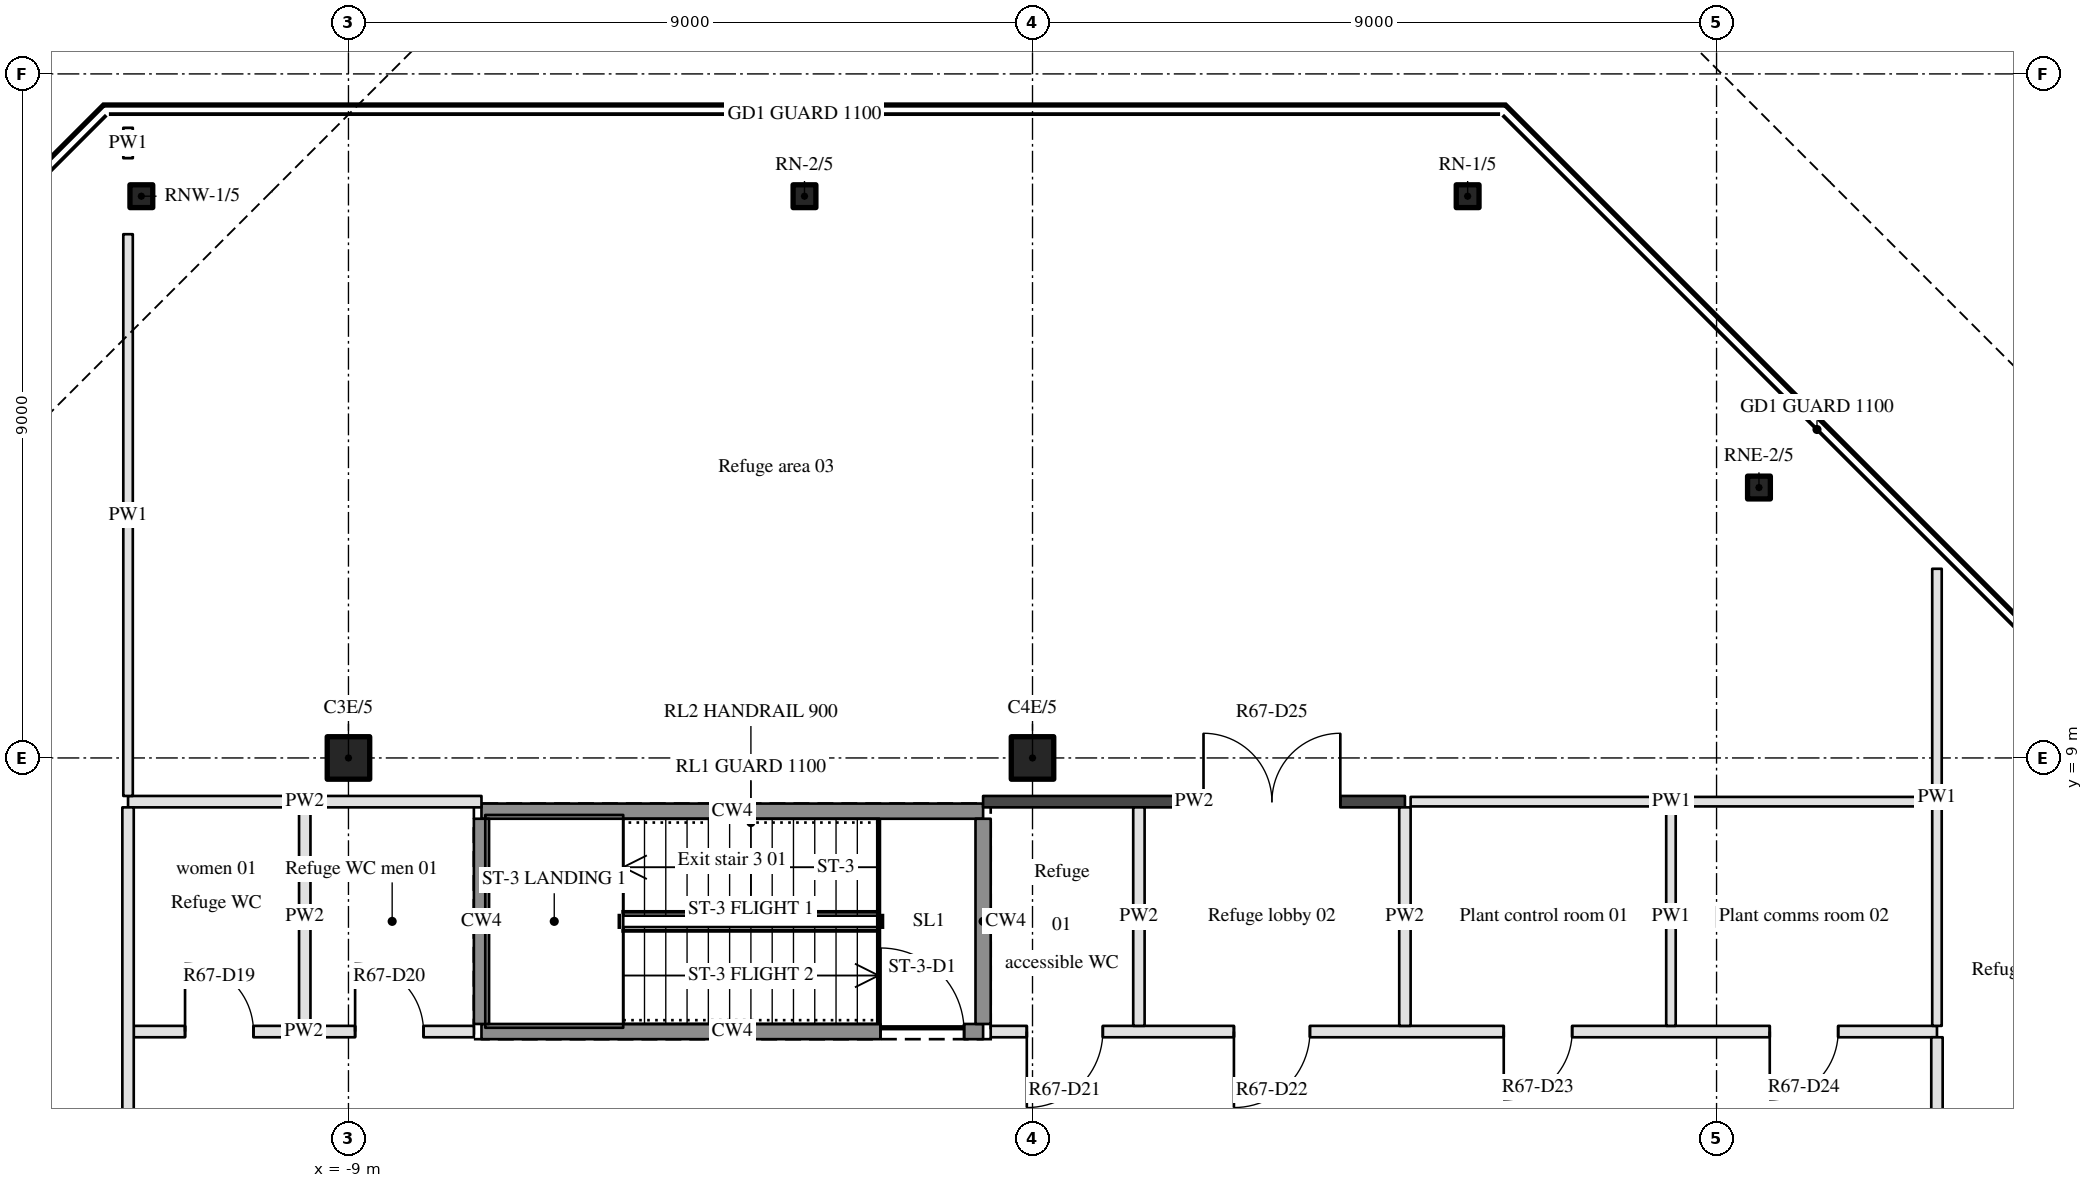
"""IFC4 building model, lengths in metres.
Left out: names, types, materials, properties, quantities, classifications, styles, units other than length and angle.
Written with IfcOpenShell. Run it as: python <this file> out.ifc"""

import sys

from ifc_helpers import new_model, si_unit, direction, frame, frame_2d, origin, origin_2d, place, context, subcontext, project, spatial, rectangle, hollow_rectangle, hollow_circle, extrude, element, fill, save


model = new_model("IFC4")
c1 = context("Model", 3, precision=1e-05, world=origin(), true_north=direction((0.0, 1.0)))
c2 = subcontext(c1, "Body", "Model", "MODEL_VIEW")
j1 = project(units=[si_unit("LENGTHUNIT", "METRE"), si_unit("PLANEANGLEUNIT", "RADIAN")], contexts=[c1])
p1 = place(None, origin())
s1 = spatial("IfcSite", under=j1, at=p1, CompositionType="ELEMENT")
p2 = place(p1, origin())
s2 = spatial("IfcBuilding", under=s1, at=p2, CompositionType="ELEMENT")
p3 = place(p2, frame((0.0, 0.0, 255.0)))
s3 = spatial("IfcBuildingStorey", under=s2, at=p3, CompositionType="ELEMENT", Elevation=255.0)
p4 = place(p3, frame((-9.0, 9.0, 0.0), z_axis=(0.0, 0.0, 1.0), x_axis=(1.0, 0.0, 0.0)))
e1 = element("IfcColumn", 1, at=p4, inside=s3, PredefinedType="COLUMN", context=c2, shape_type="SweptSolid", body=[
    extrude(hollow_circle(Radius=0.28, WallThickness=0.025, at=origin_2d()), origin(), (0.0, 0.0, 1.0), 4.08),
])
p5 = place(p3, frame((0.0, 9.0, 0.0), z_axis=(0.0, 0.0, 1.0), x_axis=(1.0, 0.0, 0.0)))
e2 = element("IfcColumn", 2, at=p5, inside=s3, PredefinedType="COLUMN", context=c2, shape_type="SweptSolid", body=[
    extrude(hollow_circle(Radius=0.28, WallThickness=0.025, at=origin_2d()), origin(), (0.0, 0.0, 1.0), 4.5),
])
for number, where, z_axis, x_axis in (
    (3, (9.558, 12.558, 0.0), (0.0, 0.0, 1.0), (1.0, 0.0, 0.0)),
    (4, (5.725, 16.391, 0.0), (0.0, 0.0, 1.0), (1.0, 0.0, 0.0)),
    (5, (-3.0, 16.391, 0.0), (0.0, 0.0, 1.0), (1.0, 0.0, 0.0)),
):
    element("IfcColumn", number, at=place(p3, frame(where, z_axis=z_axis, x_axis=x_axis)), inside=s3, PredefinedType="COLUMN", context=c2, shape_type="SweptSolid", body=[
        extrude(hollow_rectangle(XDim=0.3, YDim=0.3, WallThickness=0.02, InnerFilletRadius=0.03, OuterFilletRadius=0.05, at=origin_2d()), origin(), (0.0, 0.0, 1.0), 4.08),
    ])
p6 = place(p3, frame((-11.725, 16.391, 0.0), z_axis=(0.0, 0.0, 1.0), x_axis=(1.0, 0.0, 0.0)))
e6 = element("IfcColumn", 6, at=p6, inside=s3, PredefinedType="COLUMN", context=c2, shape_type="SweptSolid", body=[
    extrude(hollow_rectangle(XDim=0.3, YDim=0.3, WallThickness=0.02, InnerFilletRadius=0.03, OuterFilletRadius=0.05, at=origin_2d()), origin(), (0.0, 0.0, 1.0), 4.25),
])
p7 = place(p3, frame((-11.825, 5.4, 0.0), z_axis=(0.0, 0.0, 1.0), x_axis=(1.0, 0.0, 0.0)))
e7 = element("IfcWall", 7, at=p7, inside=s3, PredefinedType="PARTITIONING", context=c2, shape_type="SweptSolid", body=[
    extrude(rectangle(XDim=4.475, YDim=0.15, at=frame_2d((2.237, 0.0))), origin(), (0.0, 0.0, 1.0), 3.56),
])
p8 = place(p7, frame((0.675, 0.0, 0.0)))
e8 = element("IfcOpeningElement", 8, at=p8, cuts=e7, PredefinedType="OPENING", context=c2, shape_type="SweptSolid", body=[
    extrude(rectangle(XDim=0.9, YDim=2.1, at=frame_2d((0.45, 1.05))), frame((0.0, 0.085, 0.0), z_axis=(0.0, -1.0, 0.0), x_axis=(1.0, 0.0, 0.0)), (0.0, 0.0, 1.0), 0.17),
])
p9 = place(p7, frame((2.913, 0.0, 0.0)))
e9 = element("IfcOpeningElement", 9, at=p9, cuts=e7, PredefinedType="OPENING", context=c2, shape_type="SweptSolid", body=[
    extrude(rectangle(XDim=0.9, YDim=2.1, at=frame_2d((0.45, 1.05))), frame((0.0, 0.085, 0.0), z_axis=(0.0, -1.0, 0.0), x_axis=(1.0, 0.0, 0.0)), (0.0, 0.0, 1.0), 0.17),
])
p10 = place(p3, frame((-7.25, 5.4, 0.0), z_axis=(0.0, 0.0, 1.0), x_axis=(1.0, 0.0, 0.0)))
e10 = element("IfcWall", 10, at=p10, inside=s3, PredefinedType="SHEAR", context=c2, shape_type="SweptSolid", body=[
    extrude(rectangle(XDim=6.6, YDim=0.2, at=frame_2d((3.3, 0.0))), origin(), (0.0, 0.0, 1.0), 4.5),
])
p11 = place(p10, frame((5.25, 0.0, 0.0)))
e11 = element("IfcOpeningElement", 11, at=p11, cuts=e10, PredefinedType="OPENING", context=c2, shape_type="SweptSolid", body=[
    extrude(rectangle(XDim=1.1, YDim=2.1, at=frame_2d((0.55, 1.05))), frame((0.0, 0.11, 0.0), z_axis=(0.0, -1.0, 0.0), x_axis=(1.0, 0.0, 0.0)), (0.0, 0.0, 1.0), 0.22),
])
p12 = place(p3, frame((11.9, 5.4, 0.0), z_axis=(0.0, 0.0, 1.0), x_axis=(-1.0, 0.0, 0.0)))
e12 = element("IfcWall", 12, at=p12, inside=s3, PredefinedType="PARTITIONING", context=c2, shape_type="SweptSolid", body=[
    extrude(rectangle(XDim=12.45, YDim=0.15, at=frame_2d((6.225, 0.0))), origin(), (0.0, 0.0, 1.0), 3.56),
])
p13 = place(p12, frame((8.25, 0.0, 0.0)))
e13 = element("IfcOpeningElement", 13, at=p13, cuts=e12, PredefinedType="OPENING", context=c2, shape_type="SweptSolid", body=[
    extrude(rectangle(XDim=1.0, YDim=2.1, at=frame_2d((0.5, 1.05))), frame((0.0, 0.085, 0.0), z_axis=(0.0, -1.0, 0.0), x_axis=(1.0, 0.0, 0.0)), (0.0, 0.0, 1.0), 0.17),
])
p14 = place(p12, frame((10.975, 0.0, 0.0)))
e14 = element("IfcOpeningElement", 14, at=p14, cuts=e12, PredefinedType="OPENING", context=c2, shape_type="SweptSolid", body=[
    extrude(rectangle(XDim=1.0, YDim=2.1, at=frame_2d((0.5, 1.05))), frame((0.0, 0.085, 0.0), z_axis=(0.0, -1.0, 0.0), x_axis=(1.0, 0.0, 0.0)), (0.0, 0.0, 1.0), 0.17),
])
p15 = place(p12, frame((4.8, 0.0, 0.0)))
e15 = element("IfcOpeningElement", 15, at=p15, cuts=e12, PredefinedType="OPENING", context=c2, shape_type="SweptSolid", body=[
    extrude(rectangle(XDim=0.9, YDim=2.1, at=frame_2d((0.45, 1.05))), frame((0.0, 0.085, 0.0), z_axis=(0.0, -1.0, 0.0), x_axis=(1.0, 0.0, 0.0)), (0.0, 0.0, 1.0), 0.17),
])
p16 = place(p12, frame((1.3, 0.0, 0.0)))
e16 = element("IfcOpeningElement", 16, at=p16, cuts=e12, PredefinedType="OPENING", context=c2, shape_type="SweptSolid", body=[
    extrude(rectangle(XDim=0.9, YDim=2.1, at=frame_2d((0.45, 1.05))), frame((0.0, 0.085, 0.0), z_axis=(0.0, -1.0, 0.0), x_axis=(1.0, 0.0, 0.0)), (0.0, 0.0, 1.0), 0.17),
])
p17 = place(p3, frame((-7.25, 8.3, 0.0), z_axis=(0.0, 0.0, 1.0), x_axis=(1.0, 0.0, 0.0)))
e17 = element("IfcWall", 17, at=p17, inside=s3, PredefinedType="SHEAR", context=c2, shape_type="SweptSolid", body=[
    extrude(rectangle(XDim=6.6, YDim=0.2, at=frame_2d((3.3, 0.0))), origin(), (0.0, 0.0, 1.0), 4.5),
])
p18 = place(p3, frame((-11.9, 8.425, 0.0), z_axis=(0.0, 0.0, 1.0), x_axis=(1.0, 0.0, 0.0)))
e18 = element("IfcWall", 18, at=p18, inside=s3, PredefinedType="PARTITIONING", context=c2, shape_type="SweptSolid", body=[
    extrude(rectangle(XDim=4.65, YDim=0.15, at=frame_2d((2.325, 0.0))), origin(), (0.0, 0.0, 1.0), 3.56),
])
p19 = place(p3, frame((-0.65, 8.425, 0.0), z_axis=(0.0, 0.0, 1.0), x_axis=(1.0, 0.0, 0.0)))
e19 = element("IfcWall", 19, at=p19, inside=s3, PredefinedType="PARTITIONING", context=c2, shape_type="SweptSolid", body=[
    extrude(rectangle(XDim=5.55, YDim=0.15, at=frame_2d((2.775, 0.0))), origin(), (0.0, 0.0, 1.0), 3.08),
])
p20 = place(p19, frame((2.9, 0.0, 0.0)))
e20 = element("IfcOpeningElement", 20, at=p20, cuts=e19, PredefinedType="OPENING", context=c2, shape_type="SweptSolid", body=[
    extrude(rectangle(XDim=1.8, YDim=2.1, at=frame_2d((0.9, 1.05))), frame((0.0, 0.085, 0.0), z_axis=(0.0, -1.0, 0.0), x_axis=(1.0, 0.0, 0.0)), (0.0, 0.0, 1.0), 0.17),
])
p21 = place(p3, frame((4.975, 8.425, 0.0), z_axis=(0.0, 0.0, 1.0), x_axis=(1.0, 0.0, 0.0)))
e21 = element("IfcWall", 21, at=p21, inside=s3, PredefinedType="PARTITIONING", context=c2, shape_type="SweptSolid", body=[
    extrude(rectangle(XDim=6.862, YDim=0.125, at=frame_2d((3.431, 0.0))), origin(), (0.0, 0.0, 1.0), 3.56),
])
p22 = place(p3, frame((-11.9, 8.35, 0.0), z_axis=(0.0, 0.0, 1.0), x_axis=(0.0, -1.0, 0.0)))
e22 = element("IfcWall", 22, at=p22, inside=s3, PredefinedType="PARTITIONING", context=c2, shape_type="SweptSolid", body=[
    extrude(rectangle(XDim=23.175, YDim=0.15, at=frame_2d((11.587, 0.0))), origin(), (0.0, 0.0, 1.0), 3.56),
])
p23 = place(p22, frame((12.163, 0.0, 0.0)))
e23 = element("IfcOpeningElement", 23, at=p23, cuts=e22, PredefinedType="OPENING", context=c2, shape_type="SweptSolid", body=[
    extrude(rectangle(XDim=1.8, YDim=2.1, at=frame_2d((0.9, 1.05))), frame((0.0, 0.085, 0.0), z_axis=(0.0, -1.0, 0.0), x_axis=(1.0, 0.0, 0.0)), (0.0, 0.0, 1.0), 0.17),
])
p24 = place(p22, frame((8.725, 0.0, 0.0)))
e24 = element("IfcOpeningElement", 24, at=p24, cuts=e22, PredefinedType="OPENING", context=c2, shape_type="SweptSolid", body=[
    extrude(rectangle(XDim=1.8, YDim=2.1, at=frame_2d((0.9, 1.05))), frame((0.0, 0.085, 0.0), z_axis=(0.0, -1.0, 0.0), x_axis=(1.0, 0.0, 0.0)), (0.0, 0.0, 1.0), 0.17),
])
p25 = place(p3, frame((-11.9, 8.5, 0.0), z_axis=(0.0, 0.0, 1.0), x_axis=(0.0, 1.0, 0.0)))
e25 = element("IfcWall", 25, at=p25, inside=s3, PredefinedType="PARTITIONING", context=c2, shape_type="SweptSolid", body=[
    extrude(rectangle(XDim=7.391, YDim=0.125, at=frame_2d((3.696, 0.0))), origin(), (0.0, 0.0, 1.0), 3.56),
])
p26 = place(p3, frame((-11.9, 16.891, 0.0), z_axis=(0.0, 0.0, 1.0), x_axis=(0.0, 1.0, 0.0)))
e26 = element("IfcWall", 26, at=p26, inside=s3, PredefinedType="PARTITIONING", context=c2, shape_type="SweptSolid", body=[
    extrude(rectangle(XDim=0.4, YDim=0.125, at=frame_2d((0.2, 0.0))), origin(), (0.0, 0.0, 1.0), 3.56),
])
p27 = place(p3, frame((-9.575, 5.475, 0.0), z_axis=(0.0, 0.0, 1.0), x_axis=(0.0, 1.0, 0.0)))
e27 = element("IfcWall", 27, at=p27, inside=s3, PredefinedType="PARTITIONING", context=c2, shape_type="SweptSolid", body=[
    extrude(rectangle(XDim=2.875, YDim=0.15, at=frame_2d((1.438, 0.0))), origin(), (0.0, 0.0, 1.0), 3.56),
])
for number, where, z_axis, x_axis in (
    (28, (-7.25, 5.5, 0.0), (0.0, 0.0, 1.0), (0.0, 1.0, 0.0)),
    (29, (-0.65, 5.5, 0.0), (0.0, 0.0, 1.0), (0.0, 1.0, 0.0)),
):
    element("IfcWall", number, at=place(p3, frame(where, z_axis=z_axis, x_axis=x_axis)), inside=s3, PredefinedType="SHEAR", context=c2, shape_type="SweptSolid", body=[
        extrude(rectangle(XDim=2.7, YDim=0.2, at=frame_2d((1.35, 0.0))), origin(), (0.0, 0.0, 1.0), 4.5),
    ])
for number, where, z_axis, x_axis in (
    (30, (1.4, 5.475, 0.0), (0.0, 0.0, 1.0), (0.0, 1.0, 0.0)),
    (31, (4.9, 5.475, 0.0), (0.0, 0.0, 1.0), (0.0, 1.0, 0.0)),
):
    element("IfcWall", number, at=place(p3, frame(where, z_axis=z_axis, x_axis=x_axis)), inside=s3, PredefinedType="PARTITIONING", context=c2, shape_type="SweptSolid", body=[
        extrude(rectangle(XDim=2.875, YDim=0.15, at=frame_2d((1.438, 0.0))), origin(), (0.0, 0.0, 1.0), 3.56),
    ])
p28 = place(p3, frame((8.4, 5.475, 0.0), z_axis=(0.0, 0.0, 1.0), x_axis=(0.0, 1.0, 0.0)))
e32 = element("IfcWall", 32, at=p28, inside=s3, PredefinedType="PARTITIONING", context=c2, shape_type="SweptSolid", body=[
    extrude(rectangle(XDim=2.887, YDim=0.125, at=frame_2d((1.444, 0.0))), origin(), (0.0, 0.0, 1.0), 3.56),
])
p29 = place(p3, frame((11.9, -14.825, 0.0), z_axis=(0.0, 0.0, 1.0), x_axis=(0.0, 1.0, 0.0)))
e33 = element("IfcWall", 33, at=p29, inside=s3, PredefinedType="PARTITIONING", context=c2, shape_type="SweptSolid", body=[
    extrude(rectangle(XDim=20.15, YDim=0.15, at=frame_2d((10.075, 0.0))), origin(), (0.0, 0.0, 1.0), 3.56),
])
p30 = place(p29, frame((9.475, 0.0, 0.0)))
e34 = element("IfcOpeningElement", 34, at=p30, cuts=e33, PredefinedType="OPENING", context=c2, shape_type="SweptSolid", body=[
    extrude(rectangle(XDim=1.8, YDim=2.1, at=frame_2d((0.9, 1.05))), frame((0.0, 0.085, 0.0), z_axis=(0.0, -1.0, 0.0), x_axis=(1.0, 0.0, 0.0)), (0.0, 0.0, 1.0), 0.17),
])
p31 = place(p29, frame((12.95, 0.0, 0.0)))
e35 = element("IfcOpeningElement", 35, at=p31, cuts=e33, PredefinedType="OPENING", context=c2, shape_type="SweptSolid", body=[
    extrude(rectangle(XDim=1.8, YDim=2.1, at=frame_2d((0.9, 1.05))), frame((0.0, 0.085, 0.0), z_axis=(0.0, -1.0, 0.0), x_axis=(1.0, 0.0, 0.0)), (0.0, 0.0, 1.0), 0.17),
])
p32 = place(p3, frame((11.9, 5.475, 0.0), z_axis=(0.0, 0.0, 1.0), x_axis=(0.0, 1.0, 0.0)))
e36 = element("IfcWall", 36, at=p32, inside=s3, PredefinedType="PARTITIONING", context=c2, shape_type="SweptSolid", body=[
    extrude(rectangle(XDim=6.014, YDim=0.125, at=frame_2d((3.007, 0.0))), origin(), (0.0, 0.0, 1.0), 3.56),
])
p33 = place(p13, origin())
e37 = element("IfcDoor", 37, at=p33, inside=s3, OperationType="SINGLE_SWING_RIGHT", PredefinedType="DOOR", context=c2, shape_type="SweptSolid", body=[
    extrude(rectangle(XDim=1.0, YDim=2.1, at=frame_2d((0.5, 1.05))), frame((0.0, 0.025, 0.0), z_axis=(0.0, -1.0, 0.0), x_axis=(1.0, 0.0, 0.0)), (0.0, 0.0, 1.0), 0.05),
])
fill(e13, e37)
p34 = place(p20, origin())
e38 = element("IfcDoor", 38, at=p34, inside=s3, OperationType="DOUBLE_DOOR_SINGLE_SWING", PredefinedType="DOOR", context=c2, shape_type="SweptSolid", body=[
    extrude(rectangle(XDim=1.8, YDim=2.1, at=frame_2d((0.9, 1.05))), frame((0.0, 0.025, 0.0), z_axis=(0.0, -1.0, 0.0), x_axis=(1.0, 0.0, 0.0)), (0.0, 0.0, 1.0), 0.05),
])
fill(e20, e38)
p35 = place(p11, origin())
e39 = element("IfcDoor", 39, at=p35, inside=s3, OperationType="SINGLE_SWING_LEFT", PredefinedType="DOOR", context=c2, shape_type="SweptSolid", body=[
    extrude(rectangle(XDim=1.1, YDim=2.1, at=frame_2d((0.55, 1.05))), frame((0.0, 0.025, 0.0), z_axis=(0.0, -1.0, 0.0), x_axis=(1.0, 0.0, 0.0)), (0.0, 0.0, 1.0), 0.05),
])
fill(e11, e39)
p36 = place(p8, origin())
e40 = element("IfcDoor", 40, at=p36, inside=s3, OperationType="SINGLE_SWING_LEFT", PredefinedType="DOOR", context=c2, shape_type="SweptSolid", body=[
    extrude(rectangle(XDim=0.9, YDim=2.1, at=frame_2d((0.45, 1.05))), frame((0.0, 0.025, 0.0), z_axis=(0.0, -1.0, 0.0), x_axis=(1.0, 0.0, 0.0)), (0.0, 0.0, 1.0), 0.05),
])
fill(e8, e40)
p37 = place(p9, origin())
e41 = element("IfcDoor", 41, at=p37, inside=s3, OperationType="SINGLE_SWING_LEFT", PredefinedType="DOOR", context=c2, shape_type="SweptSolid", body=[
    extrude(rectangle(XDim=0.9, YDim=2.1, at=frame_2d((0.45, 1.05))), frame((0.0, 0.025, 0.0), z_axis=(0.0, -1.0, 0.0), x_axis=(1.0, 0.0, 0.0)), (0.0, 0.0, 1.0), 0.05),
])
fill(e9, e41)
p38 = place(p14, origin())
e42 = element("IfcDoor", 42, at=p38, inside=s3, OperationType="SINGLE_SWING_RIGHT", PredefinedType="DOOR", context=c2, shape_type="SweptSolid", body=[
    extrude(rectangle(XDim=1.0, YDim=2.1, at=frame_2d((0.5, 1.05))), frame((0.0, 0.025, 0.0), z_axis=(0.0, -1.0, 0.0), x_axis=(1.0, 0.0, 0.0)), (0.0, 0.0, 1.0), 0.05),
])
fill(e14, e42)
p39 = place(p15, origin())
e43 = element("IfcDoor", 43, at=p39, inside=s3, OperationType="SINGLE_SWING_RIGHT", PredefinedType="DOOR", context=c2, shape_type="SweptSolid", body=[
    extrude(rectangle(XDim=0.9, YDim=2.1, at=frame_2d((0.45, 1.05))), frame((0.0, 0.025, 0.0), z_axis=(0.0, -1.0, 0.0), x_axis=(1.0, 0.0, 0.0)), (0.0, 0.0, 1.0), 0.05),
])
fill(e15, e43)
p40 = place(p16, origin())
e44 = element("IfcDoor", 44, at=p40, inside=s3, OperationType="SINGLE_SWING_RIGHT", PredefinedType="DOOR", context=c2, shape_type="SweptSolid", body=[
    extrude(rectangle(XDim=0.9, YDim=2.1, at=frame_2d((0.45, 1.05))), frame((0.0, 0.025, 0.0), z_axis=(0.0, -1.0, 0.0), x_axis=(1.0, 0.0, 0.0)), (0.0, 0.0, 1.0), 0.05),
])
fill(e16, e44)
save(model, sys.argv[1])
